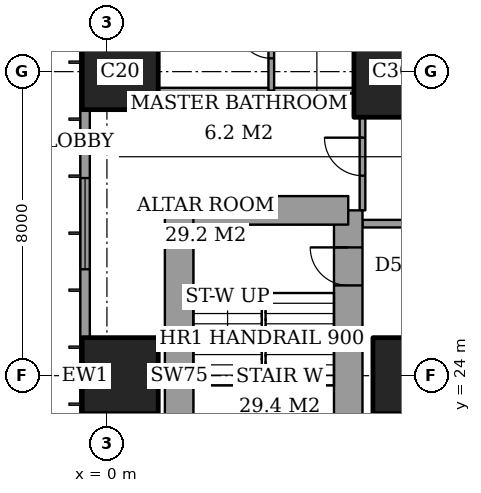
"""IFC4 building model, lengths in metres.
Left out: names, types, materials, properties, quantities, classifications, styles, units other than length and angle.
Written with IfcOpenShell. Run it as: python <this file> out.ifc"""

import sys

from ifc_helpers import new_model, si_unit, direction, frame, frame_2d, origin, origin_2d, place, context, subcontext, project, spatial, rectangle, extrude, element, fill, save


model = new_model("IFC4")
c1 = context("Model", 3, precision=1e-05, world=origin(), true_north=direction((0.0, 1.0)))
c2 = subcontext(c1, "Body", "Model", "MODEL_VIEW")
j1 = project(units=[si_unit("LENGTHUNIT", "METRE"), si_unit("PLANEANGLEUNIT", "RADIAN")], contexts=[c1])
p1 = place(None, origin())
s1 = spatial("IfcSite", under=j1, at=p1, CompositionType="ELEMENT")
p2 = place(p1, origin())
s2 = spatial("IfcBuilding", under=s1, at=p2, CompositionType="ELEMENT")
p3 = place(p2, frame((0.0, 0.0, 58.4)))
s3 = spatial("IfcBuildingStorey", under=s2, at=p3, CompositionType="ELEMENT", Elevation=58.4)
for number, where, z_axis, x_axis in (
    (1, (0.35, 24.0, 0.0), (0.0, 0.0, 1.0), (1.0, 0.0, 0.0)),
    (2, (0.35, 32.0, 0.0), (0.0, 0.0, 1.0), (1.0, 0.0, 0.0)),
    (3, (8.0, 24.0, 0.0), (0.0, 0.0, 1.0), (1.0, 0.0, 0.0)),
):
    element("IfcColumn", number, at=place(p3, frame(where, z_axis=z_axis, x_axis=x_axis)), inside=s3, PredefinedType="COLUMN", context=c2, shape_type="SweptSolid", body=[
        extrude(rectangle(XDim=2.0, YDim=2.0, at=origin_2d()), origin(), (0.0, 0.0, 1.0), 3.6),
    ])
p4 = place(p3, frame((8.0, 32.0, 0.0), z_axis=(0.0, 0.0, 1.0), x_axis=(1.0, 0.0, 0.0)))
e4 = element("IfcColumn", 4, at=p4, inside=s3, PredefinedType="COLUMN", context=c2, shape_type="SweptSolid", body=[
    extrude(rectangle(XDim=3.0, YDim=2.4, at=origin_2d()), origin(), (0.0, 0.0, 1.0), 3.6),
])
p5 = place(p3, frame((6.35, 19.65, 0.0), z_axis=(0.0, 0.0, 1.0), x_axis=(0.0, 1.0, 0.0)))
e5 = element("IfcWall", 5, at=p5, inside=s3, PredefinedType="SHEAR", context=c2, shape_type="SweptSolid", body=[
    extrude(rectangle(XDim=8.7, YDim=0.75, at=frame_2d((4.35, 0.0))), origin(), (0.0, 0.0, 1.0), 3.6),
])
p6 = place(p5, frame((6.725, 0.0, 0.0)))
e6 = element("IfcOpeningElement", 6, at=p6, cuts=e5, PredefinedType="OPENING", context=c2, shape_type="SweptSolid", body=[
    extrude(rectangle(XDim=1.0, YDim=2.1, at=frame_2d((0.5, 1.05))), frame((0.0, 0.385, 0.0), z_axis=(0.0, -1.0, 0.0), x_axis=(1.0, 0.0, 0.0)), (0.0, 0.0, 1.0), 0.77),
])
p7 = place(p3, frame((6.35, 28.35, 0.0), z_axis=(0.0, 0.0, 1.0), x_axis=(-1.0, 0.0, 0.0)))
e7 = element("IfcWall", 7, at=p7, inside=s3, PredefinedType="SHEAR", context=c2, shape_type="SweptSolid", body=[
    extrude(rectangle(XDim=4.45, YDim=0.75, at=frame_2d((2.225, 0.0))), origin(), (0.0, 0.0, 1.0), 3.6),
])
p8 = place(p3, frame((1.9, 28.35, 0.0), z_axis=(0.0, 0.0, 1.0), x_axis=(0.0, -1.0, 0.0)))
e8 = element("IfcWall", 8, at=p8, inside=s3, PredefinedType="SHEAR", context=c2, shape_type="SweptSolid", body=[
    extrude(rectangle(XDim=8.7, YDim=0.75, at=frame_2d((4.35, 0.0))), origin(), (0.0, 0.0, 1.0), 3.6),
])
p9 = place(p3, frame((-0.575, 44.825, 0.0), z_axis=(0.0, 0.0, 1.0), x_axis=(0.0, -1.0, 0.0)))
e9 = element("IfcWall", 9, at=p9, inside=s3, PredefinedType="SOLIDWALL", context=c2, shape_type="SweptSolid", body=[
    extrude(rectangle(XDim=41.65, YDim=0.25, at=frame_2d((20.825, 0.0))), origin(), (0.0, 0.0, 1.0), 3.6),
])
p10 = place(p9, frame((0.775, 0.0, 0.6)))
e10 = element("IfcOpeningElement", 10, at=p10, cuts=e9, PredefinedType="OPENING", context=c2, shape_type="SweptSolid", body=[
    extrude(rectangle(XDim=2.4, YDim=2.0, at=frame_2d((1.2, 1.0))), frame((0.0, 0.135, 0.0), z_axis=(0.0, -1.0, 0.0), x_axis=(1.0, 0.0, 0.0)), (0.0, 0.0, 1.0), 0.27),
])
p11 = place(p9, frame((6.1, 0.0, 0.6)))
e11 = element("IfcOpeningElement", 11, at=p11, cuts=e9, PredefinedType="OPENING", context=c2, shape_type="SweptSolid", body=[
    extrude(rectangle(XDim=1.2, YDim=2.0, at=frame_2d((0.6, 1.0))), frame((0.0, 0.135, 0.0), z_axis=(0.0, -1.0, 0.0), x_axis=(1.0, 0.0, 0.0)), (0.0, 0.0, 1.0), 0.27),
])
p12 = place(p9, frame((8.425, 0.0, 0.6)))
e12 = element("IfcOpeningElement", 12, at=p12, cuts=e9, PredefinedType="OPENING", context=c2, shape_type="SweptSolid", body=[
    extrude(rectangle(XDim=2.4, YDim=2.0, at=frame_2d((1.2, 1.0))), frame((0.0, 0.135, 0.0), z_axis=(0.0, -1.0, 0.0), x_axis=(1.0, 0.0, 0.0)), (0.0, 0.0, 1.0), 0.27),
])
p13 = place(p9, frame((15.625, 0.0, 0.6)))
e13 = element("IfcOpeningElement", 13, at=p13, cuts=e9, PredefinedType="OPENING", context=c2, shape_type="SweptSolid", body=[
    extrude(rectangle(XDim=2.4, YDim=2.0, at=frame_2d((1.2, 1.0))), frame((0.0, 0.135, 0.0), z_axis=(0.0, -1.0, 0.0), x_axis=(1.0, 0.0, 0.0)), (0.0, 0.0, 1.0), 0.27),
])
p14 = place(p9, frame((23.625, 0.0, 0.6)))
e14 = element("IfcOpeningElement", 14, at=p14, cuts=e9, PredefinedType="OPENING", context=c2, shape_type="SweptSolid", body=[
    extrude(rectangle(XDim=2.4, YDim=2.0, at=frame_2d((1.2, 1.0))), frame((0.0, 0.135, 0.0), z_axis=(0.0, -1.0, 0.0), x_axis=(1.0, 0.0, 0.0)), (0.0, 0.0, 1.0), 0.27),
])
p15 = place(p9, frame((30.825, 0.0, 0.6)))
e15 = element("IfcOpeningElement", 15, at=p15, cuts=e9, PredefinedType="OPENING", context=c2, shape_type="SweptSolid", body=[
    extrude(rectangle(XDim=2.4, YDim=2.0, at=frame_2d((1.2, 1.0))), frame((0.0, 0.135, 0.0), z_axis=(0.0, -1.0, 0.0), x_axis=(1.0, 0.0, 0.0)), (0.0, 0.0, 1.0), 0.27),
])
p16 = place(p9, frame((34.5, 0.0, 0.6)))
e16 = element("IfcOpeningElement", 16, at=p16, cuts=e9, PredefinedType="OPENING", context=c2, shape_type="SweptSolid", body=[
    extrude(rectangle(XDim=1.2, YDim=2.0, at=frame_2d((0.6, 1.0))), frame((0.0, 0.135, 0.0), z_axis=(0.0, -1.0, 0.0), x_axis=(1.0, 0.0, 0.0)), (0.0, 0.0, 1.0), 0.27),
])
p17 = place(p9, frame((38.475, 0.0, 0.6)))
e17 = element("IfcOpeningElement", 17, at=p17, cuts=e9, PredefinedType="OPENING", context=c2, shape_type="SweptSolid", body=[
    extrude(rectangle(XDim=2.4, YDim=2.0, at=frame_2d((1.2, 1.0))), frame((0.0, 0.135, 0.0), z_axis=(0.0, -1.0, 0.0), x_axis=(1.0, 0.0, 0.0)), (0.0, 0.0, 1.0), 0.27),
])
p18 = place(p3, frame((6.725, 28.0, 0.0), z_axis=(0.0, 0.0, 1.0), x_axis=(1.0, 0.0, 0.0)))
e18 = element("IfcWall", 18, at=p18, inside=s3, PredefinedType="PARTITIONING", context=c2, shape_type="SweptSolid", body=[
    extrude(rectangle(XDim=17.275, YDim=0.2, at=frame_2d((8.637, 0.0))), origin(), (0.0, 0.0, 1.0), 3.35),
])
p19 = place(p18, frame((6.475, 0.0, 0.0)))
e19 = element("IfcOpeningElement", 19, at=p19, cuts=e18, PredefinedType="OPENING", context=c2, shape_type="SweptSolid", body=[
    extrude(rectangle(XDim=1.2, YDim=2.4, at=frame_2d((0.6, 1.2))), frame((0.0, 0.11, 0.0), z_axis=(0.0, -1.0, 0.0), x_axis=(1.0, 0.0, 0.0)), (0.0, 0.0, 1.0), 0.22),
])
p20 = place(p3, frame((1.35, 31.5, 0.0), z_axis=(0.0, 0.0, 1.0), x_axis=(1.0, 0.0, 0.0)))
e20 = element("IfcWall", 20, at=p20, inside=s3, PredefinedType="PARTITIONING", context=c2, shape_type="SweptSolid", body=[
    extrude(rectangle(XDim=5.15, YDim=0.15, at=frame_2d((2.575, 0.0))), origin(), (0.0, 0.0, 1.0), 3.35),
])
p21 = place(p3, frame((4.325, 31.5, 0.0), z_axis=(0.0, 0.0, 1.0), x_axis=(0.0, 1.0, 0.0)))
e21 = element("IfcWall", 21, at=p21, inside=s3, PredefinedType="PARTITIONING", context=c2, shape_type="SweptSolid", body=[
    extrude(rectangle(XDim=2.6, YDim=0.15, at=frame_2d((1.3, 0.0))), origin(), (0.0, 0.0, 1.0), 3.35),
])
p22 = place(p21, frame((0.85, 0.0, 0.0)))
e22 = element("IfcOpeningElement", 22, at=p22, cuts=e21, PredefinedType="OPENING", context=c2, shape_type="SweptSolid", body=[
    extrude(rectangle(XDim=0.9, YDim=2.1, at=frame_2d((0.45, 1.05))), frame((0.0, 0.085, 0.0), z_axis=(0.0, -1.0, 0.0), x_axis=(1.0, 0.0, 0.0)), (0.0, 0.0, 1.0), 0.17),
])
p23 = place(p3, frame((6.725, 28.35, 0.0), z_axis=(0.0, 0.0, 1.0), x_axis=(0.0, 1.0, 0.0)))
e23 = element("IfcWall", 23, at=p23, inside=s3, PredefinedType="PARTITIONING", context=c2, shape_type="SweptSolid", body=[
    extrude(rectangle(XDim=2.45, YDim=0.15, at=frame_2d((1.225, 0.0))), origin(), (0.0, 0.0, 1.0), 3.35),
])
p24 = place(p23, frame((0.913, 0.0, 0.0)))
e24 = element("IfcOpeningElement", 24, at=p24, cuts=e23, PredefinedType="OPENING", context=c2, shape_type="SweptSolid", body=[
    extrude(rectangle(XDim=1.0, YDim=2.1, at=frame_2d((0.5, 1.05))), frame((0.0, 0.085, 0.0), z_axis=(0.0, -1.0, 0.0), x_axis=(1.0, 0.0, 0.0)), (0.0, 0.0, 1.0), 0.17),
])
p25 = place(p13, origin())
e25 = element("IfcWindow", 25, at=p25, inside=s3, PartitioningType="SINGLE_PANEL", PredefinedType="WINDOW", context=c2, shape_type="SweptSolid", body=[
    extrude(rectangle(XDim=2.4, YDim=2.0, at=frame_2d((1.2, 1.0))), frame((0.0, 0.03, 0.0), z_axis=(0.0, -1.0, 0.0), x_axis=(1.0, 0.0, 0.0)), (0.0, 0.0, 1.0), 0.06),
])
fill(e13, e25)
p26 = place(p22, origin())
e26 = element("IfcDoor", 26, at=p26, inside=s3, OperationType="SINGLE_SWING_LEFT", PredefinedType="DOOR", context=c2, shape_type="SweptSolid", body=[
    extrude(rectangle(XDim=0.9, YDim=2.1, at=frame_2d((0.45, 1.05))), frame((0.0, 0.025, 0.0), z_axis=(0.0, -1.0, 0.0), x_axis=(1.0, 0.0, 0.0)), (0.0, 0.0, 1.0), 0.05),
])
fill(e22, e26)
p27 = place(p24, origin())
e27 = element("IfcDoor", 27, at=p27, inside=s3, OperationType="SINGLE_SWING_LEFT", PredefinedType="DOOR", context=c2, shape_type="SweptSolid", body=[
    extrude(rectangle(XDim=1.0, YDim=2.1, at=frame_2d((0.5, 1.05))), frame((0.0, 0.025, 0.0), z_axis=(0.0, -1.0, 0.0), x_axis=(1.0, 0.0, 0.0)), (0.0, 0.0, 1.0), 0.05),
])
fill(e24, e27)
p28 = place(p6, origin())
e28 = element("IfcDoor", 28, at=p28, inside=s3, OperationType="SINGLE_SWING_LEFT", PredefinedType="DOOR", context=c2, shape_type="SweptSolid", body=[
    extrude(rectangle(XDim=1.0, YDim=2.1, at=frame_2d((0.5, 1.05))), frame((0.0, 0.025, 0.0), z_axis=(0.0, -1.0, 0.0), x_axis=(1.0, 0.0, 0.0)), (0.0, 0.0, 1.0), 0.05),
])
fill(e6, e28)
save(model, sys.argv[1])
